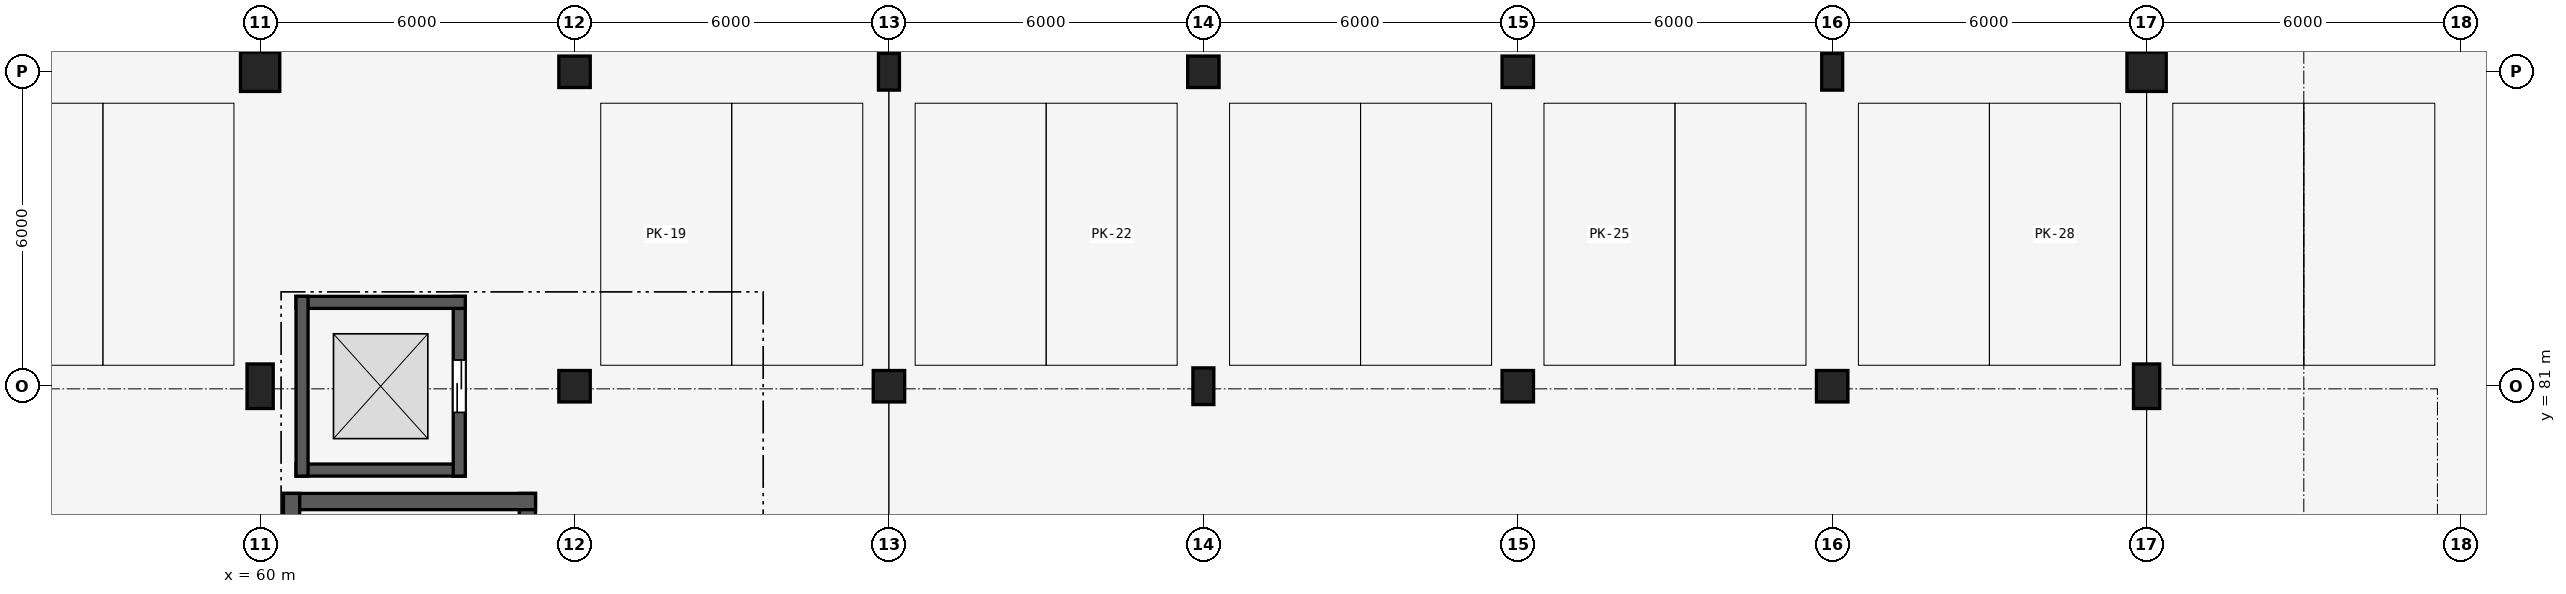
"""IFC4 building model, lengths in metres.
Left out: names, types, materials, properties, quantities, classifications, styles, units other than length and angle.
Written with IfcOpenShell. Run it as: python <this file> out.ifc"""

import sys

from ifc_helpers import new_model, si_unit, direction, frame, frame_2d, origin, origin_2d, place, context, subcontext, project, spatial, rectangle, extrude, element, fill, save


model = new_model("IFC4")
c1 = context("Model", 3, precision=1e-05, world=origin(), true_north=direction((0.0, 1.0)))
c2 = subcontext(c1, "Body", "Model", "MODEL_VIEW")
j1 = project(units=[si_unit("LENGTHUNIT", "METRE"), si_unit("PLANEANGLEUNIT", "RADIAN")], contexts=[c1])
p1 = place(None, origin())
s1 = spatial("IfcSite", under=j1, at=p1, CompositionType="ELEMENT")
p2 = place(p1, origin())
s2 = spatial("IfcBuilding", under=s1, at=p2, CompositionType="ELEMENT")
p3 = place(p2, frame((0.0, 0.0, -4.5)))
s3 = spatial("IfcBuildingStorey", under=s2, at=p3, CompositionType="ELEMENT", Elevation=-4.5)
p4 = place(p3, frame((60.0, 81.0, 0.0), z_axis=(0.0, 0.0, 1.0), x_axis=(1.0, 0.0, 0.0)))
e1 = element("IfcColumn", 1, at=p4, inside=s3, PredefinedType="COLUMN", context=c2, shape_type="SweptSolid", body=[
    extrude(rectangle(XDim=0.5, YDim=0.85, at=origin_2d()), origin(), (0.0, 0.0, 1.0), 4.5),
])
p5 = place(p3, frame((60.0, 87.0, 0.0), z_axis=(0.0, 0.0, 1.0), x_axis=(1.0, 0.0, 0.0)))
e2 = element("IfcColumn", 2, at=p5, inside=s3, PredefinedType="COLUMN", context=c2, shape_type="SweptSolid", body=[
    extrude(rectangle(XDim=0.75, YDim=0.75, at=origin_2d()), origin(), (0.0, 0.0, 1.0), 4.5),
])
for number, where, z_axis, x_axis in (
    (3, (66.0, 81.0, 0.0), (0.0, 0.0, 1.0), (1.0, 0.0, 0.0)),
    (4, (66.0, 87.0, 0.0), (0.0, 0.0, 1.0), (1.0, 0.0, 0.0)),
    (5, (72.0, 81.0, 0.0), (0.0, 0.0, 1.0), (1.0, 0.0, 0.0)),
):
    element("IfcColumn", number, at=place(p3, frame(where, z_axis=z_axis, x_axis=x_axis)), inside=s3, PredefinedType="COLUMN", context=c2, shape_type="SweptSolid", body=[
        extrude(rectangle(XDim=0.6, YDim=0.6, at=origin_2d()), origin(), (0.0, 0.0, 1.0), 4.5),
    ])
for number, where, z_axis, x_axis in (
    (6, (72.0, 87.0, 0.0), (0.0, 0.0, 1.0), (1.0, 0.0, 0.0)),
    (7, (78.0, 81.0, 0.0), (0.0, 0.0, 1.0), (1.0, 0.0, 0.0)),
):
    element("IfcColumn", number, at=place(p3, frame(where, z_axis=z_axis, x_axis=x_axis)), inside=s3, PredefinedType="COLUMN", context=c2, shape_type="SweptSolid", body=[
        extrude(rectangle(XDim=0.4, YDim=0.7, at=origin_2d()), origin(), (0.0, 0.0, 1.0), 4.5),
    ])
for number, where, z_axis, x_axis in (
    (8, (78.0, 87.0, 0.0), (0.0, 0.0, 1.0), (1.0, 0.0, 0.0)),
    (9, (84.0, 81.0, 0.0), (0.0, 0.0, 1.0), (1.0, 0.0, 0.0)),
    (10, (84.0, 87.0, 0.0), (0.0, 0.0, 1.0), (1.0, 0.0, 0.0)),
    (11, (90.0, 81.0, 0.0), (0.0, 0.0, 1.0), (1.0, 0.0, 0.0)),
):
    element("IfcColumn", number, at=place(p3, frame(where, z_axis=z_axis, x_axis=x_axis)), inside=s3, PredefinedType="COLUMN", context=c2, shape_type="SweptSolid", body=[
        extrude(rectangle(XDim=0.6, YDim=0.6, at=origin_2d()), origin(), (0.0, 0.0, 1.0), 4.5),
    ])
p6 = place(p3, frame((90.0, 87.0, 0.0), z_axis=(0.0, 0.0, 1.0), x_axis=(1.0, 0.0, 0.0)))
e12 = element("IfcColumn", 12, at=p6, inside=s3, PredefinedType="COLUMN", context=c2, shape_type="SweptSolid", body=[
    extrude(rectangle(XDim=0.4, YDim=0.7, at=origin_2d()), origin(), (0.0, 0.0, 1.0), 4.5),
])
p7 = place(p3, frame((96.0, 81.0, 0.0), z_axis=(0.0, 0.0, 1.0), x_axis=(1.0, 0.0, 0.0)))
e13 = element("IfcColumn", 13, at=p7, inside=s3, PredefinedType="COLUMN", context=c2, shape_type="SweptSolid", body=[
    extrude(rectangle(XDim=0.5, YDim=0.85, at=origin_2d()), origin(), (0.0, 0.0, 1.0), 4.5),
])
p8 = place(p3, frame((96.0, 87.0, 0.0), z_axis=(0.0, 0.0, 1.0), x_axis=(1.0, 0.0, 0.0)))
e14 = element("IfcColumn", 14, at=p8, inside=s3, PredefinedType="COLUMN", context=c2, shape_type="SweptSolid", body=[
    extrude(rectangle(XDim=0.75, YDim=0.75, at=origin_2d()), origin(), (0.0, 0.0, 1.0), 4.5),
])
p9 = place(p3, frame((65.1, 69.345, 0.0), z_axis=(0.0, 0.0, 1.0), x_axis=(0.0, 1.0, 0.0)))
e15 = element("IfcWall", 15, at=p9, inside=s3, PredefinedType="SHEAR", context=c2, shape_type="SweptSolid", body=[
    extrude(rectangle(XDim=9.61, YDim=0.31, at=frame_2d((4.805, 0.0))), origin(), (0.0, 0.0, 1.0), 4.36),
])
p10 = place(p9, frame((0.635, 0.0, 0.0)))
e16 = element("IfcOpeningElement", 16, at=p10, cuts=e15, PredefinedType="OPENING", context=c2, shape_type="SweptSolid", body=[
    extrude(rectangle(XDim=1.6, YDim=2.2, at=frame_2d((0.8, 1.1))), frame((0.0, 0.165, 0.0), z_axis=(0.0, -1.0, 0.0), x_axis=(1.0, 0.0, 0.0)), (0.0, 0.0, 1.0), 0.33),
])
p11 = place(p3, frame((65.255, 78.8, 0.0), z_axis=(0.0, 0.0, 1.0), x_axis=(-1.0, 0.0, 0.0)))
e17 = element("IfcWall", 17, at=p11, inside=s3, PredefinedType="SHEAR", context=c2, shape_type="SweptSolid", body=[
    extrude(rectangle(XDim=4.81, YDim=0.31, at=frame_2d((2.405, 0.0))), origin(), (0.0, 0.0, 1.0), 4.36),
])
p12 = place(p3, frame((60.6, 78.955, 0.0), z_axis=(0.0, 0.0, 1.0), x_axis=(0.0, -1.0, 0.0)))
e18 = element("IfcWall", 18, at=p12, inside=s3, PredefinedType="SHEAR", context=c2, shape_type="SweptSolid", body=[
    extrude(rectangle(XDim=9.61, YDim=0.31, at=frame_2d((4.805, 0.0))), origin(), (0.0, 0.0, 1.0), 4.36),
])
p13 = place(p3, frame((60.685, 79.4, 0.0), z_axis=(0.0, 0.0, 1.0), x_axis=(1.0, 0.0, 0.0)))
e19 = element("IfcWall", 19, at=p13, inside=s3, PredefinedType="SHEAR", context=c2, shape_type="SweptSolid", body=[
    extrude(rectangle(XDim=3.23, YDim=0.23, at=frame_2d((1.615, 0.0))), origin(), (0.0, 0.0, 1.0), 4.5),
])
p14 = place(p3, frame((63.8, 79.285, 0.0), z_axis=(0.0, 0.0, 1.0), x_axis=(0.0, 1.0, 0.0)))
e20 = element("IfcWall", 20, at=p14, inside=s3, PredefinedType="SHEAR", context=c2, shape_type="SweptSolid", body=[
    extrude(rectangle(XDim=3.43, YDim=0.23, at=frame_2d((1.715, 0.0))), origin(), (0.0, 0.0, 1.0), 4.5),
])
p15 = place(p14, frame((1.215, 0.0, 0.0)))
e21 = element("IfcOpeningElement", 21, at=p15, cuts=e20, PredefinedType="OPENING", context=c2, shape_type="SweptSolid", body=[
    extrude(rectangle(XDim=1.0, YDim=2.15, at=frame_2d((0.5, 1.075))), frame((0.0, 0.125, 0.0), z_axis=(0.0, -1.0, 0.0), x_axis=(1.0, 0.0, 0.0)), (0.0, 0.0, 1.0), 0.25),
])
p16 = place(p3, frame((63.915, 82.6, 0.0), z_axis=(0.0, 0.0, 1.0), x_axis=(-1.0, 0.0, 0.0)))
e22 = element("IfcWall", 22, at=p16, inside=s3, PredefinedType="SHEAR", context=c2, shape_type="SweptSolid", body=[
    extrude(rectangle(XDim=3.23, YDim=0.23, at=frame_2d((1.615, 0.0))), origin(), (0.0, 0.0, 1.0), 4.5),
])
p17 = place(p3, frame((60.8, 82.715, 0.0), z_axis=(0.0, 0.0, 1.0), x_axis=(0.0, -1.0, 0.0)))
e23 = element("IfcWall", 23, at=p17, inside=s3, PredefinedType="SHEAR", context=c2, shape_type="SweptSolid", body=[
    extrude(rectangle(XDim=3.43, YDim=0.23, at=frame_2d((1.715, 0.0))), origin(), (0.0, 0.0, 1.0), 4.5),
])
p18 = place(p15, origin())
e24 = element("IfcDoor", 24, at=p18, inside=s3, OperationType="SLIDING_TO_LEFT", PredefinedType="DOOR", context=c2, shape_type="SweptSolid", body=[
    extrude(rectangle(XDim=1.0, YDim=2.15, at=frame_2d((0.5, 1.075))), frame((0.0, 0.025, 0.0), z_axis=(0.0, -1.0, 0.0), x_axis=(1.0, 0.0, 0.0)), (0.0, 0.0, 1.0), 0.05),
])
fill(e21, e24)
save(model, sys.argv[1])
